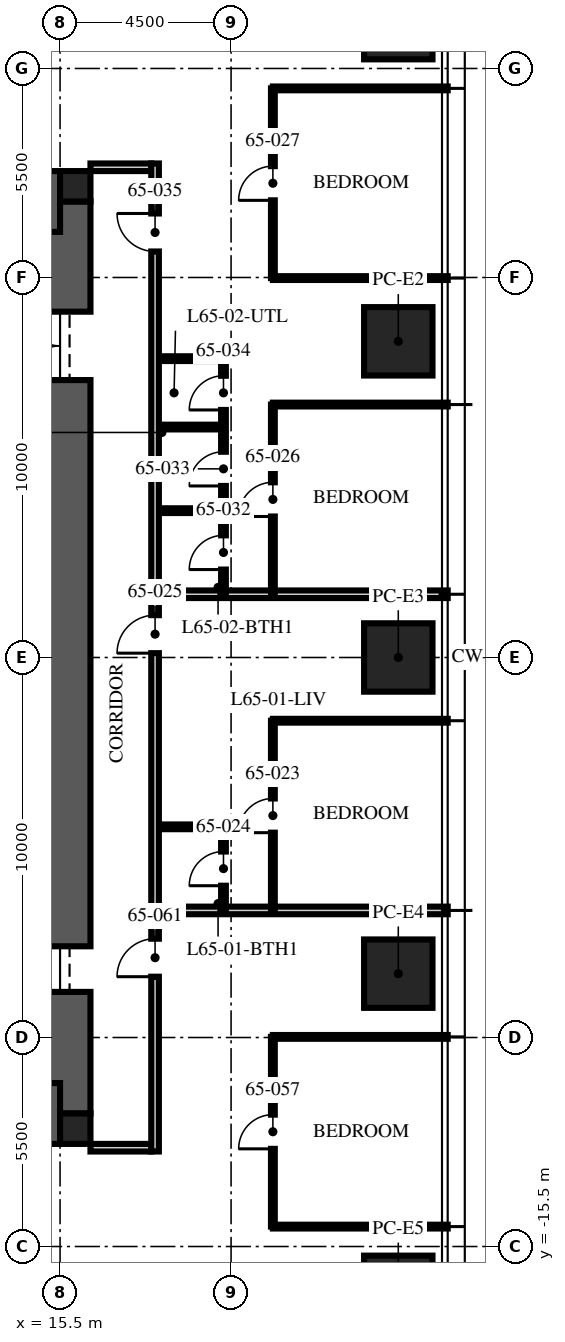
"""IFC4 building model, lengths in metres.
Left out: names, types, materials, properties, quantities, classifications, styles, units other than length and angle.
Written with IfcOpenShell. Run it as: python <this file> out.ifc"""

import sys

from ifc_helpers import new_model, si_unit, direction, frame, frame_2d, origin, origin_2d, place, context, subcontext, project, spatial, rectangle, extrude, element, fill, save


model = new_model("IFC4")
c1 = context("Model", 3, precision=1e-05, world=origin(), true_north=direction((0.0, 1.0)))
c2 = subcontext(c1, "Body", "Model", "MODEL_VIEW")
j1 = project(units=[si_unit("LENGTHUNIT", "METRE"), si_unit("PLANEANGLEUNIT", "RADIAN")], contexts=[c1])
p1 = place(None, origin())
s1 = spatial("IfcSite", under=j1, at=p1, CompositionType="ELEMENT")
p2 = place(p1, origin())
s2 = spatial("IfcBuilding", under=s1, at=p2, CompositionType="ELEMENT")
p3 = place(p2, frame((0.0, 0.0, 259.5)))
s3 = spatial("IfcBuildingStorey", under=s2, at=p3, CompositionType="ELEMENT", Elevation=259.5)
p4 = place(p3, frame((15.5, -12.0, -0.25), z_axis=(0.0, 0.0, 1.0), x_axis=(0.0, 1.0, 0.0)))
e1 = element("IfcWall", 1, at=p4, inside=s3, PredefinedType="SHEAR", context=c2, shape_type="SweptSolid", body=[
    extrude(rectangle(XDim=24.0, YDim=1.6, at=frame_2d((12.0, 0.0))), origin(), (0.0, 0.0, 1.0), 3.75),
])
p5 = place(p4, frame((3.2, 0.0, 0.25)))
e2 = element("IfcOpeningElement", 2, at=p5, cuts=e1, PredefinedType="OPENING", context=c2, shape_type="SweptSolid", body=[
    extrude(rectangle(XDim=1.2, YDim=2.1, at=frame_2d((0.6, 1.05))), frame((0.0, 0.81, 0.0), z_axis=(0.0, -1.0, 0.0), x_axis=(1.0, 0.0, 0.0)), (0.0, 0.0, 1.0), 1.62),
])
p6 = place(p4, frame((19.3, 0.0, 0.25)))
e3 = element("IfcOpeningElement", 3, at=p6, cuts=e1, PredefinedType="OPENING", context=c2, shape_type="SweptSolid", body=[
    extrude(rectangle(XDim=1.8, YDim=2.1, at=frame_2d((0.9, 1.05))), frame((0.0, 0.81, 0.0), z_axis=(0.0, -1.0, 0.0), x_axis=(1.0, 0.0, 0.0)), (0.0, 0.0, 1.0), 1.62),
])
for number, where, z_axis, x_axis in (
    (4, (-15.5, 12.0, -0.25), (0.0, 0.0, 1.0), (1.0, 0.0, 0.0)),
    (5, (-15.5, -12.0, -0.25), (0.0, 0.0, 1.0), (1.0, 0.0, 0.0)),
):
    element("IfcWall", number, at=place(p3, frame(where, z_axis=z_axis, x_axis=x_axis)), inside=s3, PredefinedType="SHEAR", context=c2, shape_type="SweptSolid", body=[
        extrude(rectangle(XDim=31.0, YDim=1.6, at=frame_2d((15.5, 0.0))), origin(), (0.0, 0.0, 1.0), 3.75),
    ])
for number, where, z_axis, x_axis in (
    (6, (15.9, 12.4, -0.25), (0.0, 0.0, 1.0), (1.0, 0.0, 0.0)),
    (7, (15.9, -12.4, -0.25), (0.0, 0.0, 1.0), (1.0, 0.0, 0.0)),
):
    element("IfcColumn", number, at=place(p3, frame(where, z_axis=z_axis, x_axis=x_axis)), inside=s3, PredefinedType="COLUMN", context=c2, shape_type="SweptSolid", body=[
        extrude(rectangle(XDim=0.8, YDim=0.8, at=origin_2d()), origin(), (0.0, 0.0, 1.0), 3.75),
    ])
for number, where, z_axis, x_axis in (
    (8, (24.4, 16.64, 0.0), (0.0, 0.0, 1.0), (0.0, 1.0, 0.0)),
    (9, (24.4, 8.32, 0.0), (0.0, 0.0, 1.0), (0.0, 1.0, 0.0)),
    (10, (24.4, 0.0, 0.0), (0.0, 0.0, 1.0), (0.0, 1.0, 0.0)),
    (11, (24.4, -8.32, 0.0), (0.0, 0.0, 1.0), (0.0, 1.0, 0.0)),
    (12, (24.4, -16.64, 0.0), (0.0, 0.0, 1.0), (0.0, 1.0, 0.0)),
):
    element("IfcColumn", number, at=place(p3, frame(where, z_axis=z_axis, x_axis=x_axis)), inside=s3, PredefinedType="COLUMN", context=c2, shape_type="SweptSolid", body=[
        extrude(rectangle(XDim=1.8, YDim=1.8, at=origin_2d()), origin(), (0.0, 0.0, 1.0), 3.75),
    ])
for number, where, z_axis, x_axis in (
    (13, (16.3, 12.9, 0.0), (0.0, 0.0, 1.0), (1.0, 0.0, 0.0)),
    (14, (16.3, -12.9, 0.0), (0.0, 0.0, 1.0), (1.0, 0.0, 0.0)),
):
    element("IfcWall", number, at=place(p3, frame(where, z_axis=z_axis, x_axis=x_axis)), inside=s3, PredefinedType="PARTITIONING", context=c2, shape_type="SweptSolid", body=[
        extrude(rectangle(XDim=1.6, YDim=0.2, at=frame_2d((0.8, 0.0))), origin(), (0.0, 0.0, 1.0), 2.3),
    ])
p7 = place(p3, frame((18.1, -6.656, 0.0), z_axis=(0.0, 0.0, 1.0), x_axis=(1.0, 0.0, 0.0)))
e15 = element("IfcWall", 15, at=p7, inside=s3, PredefinedType="PARTITIONING", context=c2, shape_type="SweptSolid", body=[
    extrude(rectangle(XDim=7.6, YDim=0.2, at=frame_2d((3.8, 0.0))), origin(), (0.0, 0.0, 1.0), 2.91),
])
p8 = place(p3, frame((21.1, -1.664, 0.0), z_axis=(0.0, 0.0, 1.0), x_axis=(1.0, 0.0, 0.0)))
e16 = element("IfcWall", 16, at=p8, inside=s3, PredefinedType="PARTITIONING", context=c2, shape_type="SweptSolid", body=[
    extrude(rectangle(XDim=4.6, YDim=0.1, at=frame_2d((2.3, 0.0))), origin(), (0.0, 0.0, 1.0), 2.91),
])
p9 = place(p3, frame((18.1, 1.664, 0.0), z_axis=(0.0, 0.0, 1.0), x_axis=(1.0, 0.0, 0.0)))
e17 = element("IfcWall", 17, at=p9, inside=s3, PredefinedType="PARTITIONING", context=c2, shape_type="SweptSolid", body=[
    extrude(rectangle(XDim=7.6, YDim=0.2, at=frame_2d((3.8, 0.0))), origin(), (0.0, 0.0, 1.0), 2.91),
])
for number, where, z_axis, x_axis in (
    (18, (21.1, 6.656, 0.0), (0.0, 0.0, 1.0), (1.0, 0.0, 0.0)),
    (19, (21.1, 9.984, 0.0), (0.0, 0.0, 1.0), (1.0, 0.0, 0.0)),
    (20, (21.1, 14.976, 0.0), (0.0, 0.0, 1.0), (1.0, 0.0, 0.0)),
    (21, (21.1, -14.976, 0.0), (0.0, 0.0, 1.0), (1.0, 0.0, 0.0)),
    (22, (21.1, -9.984, 0.0), (0.0, 0.0, 1.0), (1.0, 0.0, 0.0)),
):
    element("IfcWall", number, at=place(p3, frame(where, z_axis=z_axis, x_axis=x_axis)), inside=s3, PredefinedType="PARTITIONING", context=c2, shape_type="SweptSolid", body=[
        extrude(rectangle(XDim=4.6, YDim=0.1, at=frame_2d((2.3, 0.0))), origin(), (0.0, 0.0, 1.0), 2.91),
    ])
p10 = place(p3, frame((21.1, -6.656, 0.0), z_axis=(0.0, 0.0, 1.0), x_axis=(0.0, 1.0, 0.0)))
e23 = element("IfcWall", 23, at=p10, inside=s3, PredefinedType="PARTITIONING", context=c2, shape_type="SweptSolid", body=[
    extrude(rectangle(XDim=4.992, YDim=0.1, at=frame_2d((2.496, 0.0))), origin(), (0.0, 0.0, 1.0), 2.81),
])
p11 = place(p10, frame((2.046, 0.0, 0.0)))
e24 = element("IfcOpeningElement", 24, at=p11, cuts=e23, PredefinedType="OPENING", context=c2, shape_type="SweptSolid", body=[
    extrude(rectangle(XDim=0.9, YDim=2.1, at=frame_2d((0.45, 1.05))), frame((0.0, 0.06, 0.0), z_axis=(0.0, -1.0, 0.0), x_axis=(1.0, 0.0, 0.0)), (0.0, 0.0, 1.0), 0.12),
])
p12 = place(p3, frame((19.8, -6.656, 0.0), z_axis=(0.0, 0.0, 1.0), x_axis=(0.0, 1.0, 0.0)))
e25 = element("IfcWall", 25, at=p12, inside=s3, PredefinedType="PARTITIONING", context=c2, shape_type="SweptSolid", body=[
    extrude(rectangle(XDim=2.2, YDim=0.125, at=frame_2d((1.1, 0.0))), origin(), (0.0, 0.0, 1.0), 3.5),
])
p13 = place(p12, frame((0.65, 0.0, 0.0)))
e26 = element("IfcOpeningElement", 26, at=p13, cuts=e25, PredefinedType="OPENING", context=c2, shape_type="SweptSolid", body=[
    extrude(rectangle(XDim=0.9, YDim=2.1, at=frame_2d((0.45, 1.05))), frame((0.0, 0.073, 0.0), z_axis=(0.0, -1.0, 0.0), x_axis=(1.0, 0.0, 0.0)), (0.0, 0.0, 1.0), 0.145),
])
p14 = place(p3, frame((18.1, -4.456, 0.0), z_axis=(0.0, 0.0, 1.0), x_axis=(1.0, 0.0, 0.0)))
e27 = element("IfcWall", 27, at=p14, inside=s3, PredefinedType="PARTITIONING", context=c2, shape_type="SweptSolid", body=[
    extrude(rectangle(XDim=1.7, YDim=0.125, at=frame_2d((0.85, 0.0))), origin(), (0.0, 0.0, 1.0), 3.5),
])
p15 = place(p3, frame((21.1, 1.664, 0.0), z_axis=(0.0, 0.0, 1.0), x_axis=(0.0, 1.0, 0.0)))
e28 = element("IfcWall", 28, at=p15, inside=s3, PredefinedType="PARTITIONING", context=c2, shape_type="SweptSolid", body=[
    extrude(rectangle(XDim=4.992, YDim=0.1, at=frame_2d((2.496, 0.0))), origin(), (0.0, 0.0, 1.0), 2.81),
])
p16 = place(p15, frame((2.046, 0.0, 0.0)))
e29 = element("IfcOpeningElement", 29, at=p16, cuts=e28, PredefinedType="OPENING", context=c2, shape_type="SweptSolid", body=[
    extrude(rectangle(XDim=0.9, YDim=2.1, at=frame_2d((0.45, 1.05))), frame((0.0, 0.06, 0.0), z_axis=(0.0, -1.0, 0.0), x_axis=(1.0, 0.0, 0.0)), (0.0, 0.0, 1.0), 0.12),
])
p17 = place(p3, frame((21.1, 9.984, 0.0), z_axis=(0.0, 0.0, 1.0), x_axis=(0.0, 1.0, 0.0)))
e30 = element("IfcWall", 30, at=p17, inside=s3, PredefinedType="PARTITIONING", context=c2, shape_type="SweptSolid", body=[
    extrude(rectangle(XDim=4.992, YDim=0.1, at=frame_2d((2.496, 0.0))), origin(), (0.0, 0.0, 1.0), 2.81),
])
p18 = place(p17, frame((2.046, 0.0, 0.0)))
e31 = element("IfcOpeningElement", 31, at=p18, cuts=e30, PredefinedType="OPENING", context=c2, shape_type="SweptSolid", body=[
    extrude(rectangle(XDim=0.9, YDim=2.1, at=frame_2d((0.45, 1.05))), frame((0.0, 0.06, 0.0), z_axis=(0.0, -1.0, 0.0), x_axis=(1.0, 0.0, 0.0)), (0.0, 0.0, 1.0), 0.12),
])
p19 = place(p3, frame((19.8, 1.664, 0.0), z_axis=(0.0, 0.0, 1.0), x_axis=(0.0, 1.0, 0.0)))
e32 = element("IfcWall", 32, at=p19, inside=s3, PredefinedType="PARTITIONING", context=c2, shape_type="SweptSolid", body=[
    extrude(rectangle(XDim=6.2, YDim=0.125, at=frame_2d((3.1, 0.0))), origin(), (0.0, 0.0, 1.0), 2.81),
])
p20 = place(p19, frame((0.65, 0.0, 0.0)))
e33 = element("IfcOpeningElement", 33, at=p20, cuts=e32, PredefinedType="OPENING", context=c2, shape_type="SweptSolid", body=[
    extrude(rectangle(XDim=0.9, YDim=2.1, at=frame_2d((0.45, 1.05))), frame((0.0, 0.073, 0.0), z_axis=(0.0, -1.0, 0.0), x_axis=(1.0, 0.0, 0.0)), (0.0, 0.0, 1.0), 0.145),
])
p21 = place(p19, frame((2.85, 0.0, 0.0)))
e34 = element("IfcOpeningElement", 34, at=p21, cuts=e32, PredefinedType="OPENING", context=c2, shape_type="SweptSolid", body=[
    extrude(rectangle(XDim=0.9, YDim=2.1, at=frame_2d((0.45, 1.05))), frame((0.0, 0.073, 0.0), z_axis=(0.0, -1.0, 0.0), x_axis=(1.0, 0.0, 0.0)), (0.0, 0.0, 1.0), 0.145),
])
p22 = place(p19, frame((4.85, 0.0, 0.0)))
e35 = element("IfcOpeningElement", 35, at=p22, cuts=e32, PredefinedType="OPENING", context=c2, shape_type="SweptSolid", body=[
    extrude(rectangle(XDim=0.9, YDim=2.1, at=frame_2d((0.45, 1.05))), frame((0.0, 0.073, 0.0), z_axis=(0.0, -1.0, 0.0), x_axis=(1.0, 0.0, 0.0)), (0.0, 0.0, 1.0), 0.145),
])
for number, where, z_axis, x_axis in (
    (36, (18.1, 3.864, 0.0), (0.0, 0.0, 1.0), (1.0, 0.0, 0.0)),
    (37, (18.1, 6.064, 0.0), (0.0, 0.0, 1.0), (1.0, 0.0, 0.0)),
    (38, (18.1, 7.864, 0.0), (0.0, 0.0, 1.0), (1.0, 0.0, 0.0)),
):
    element("IfcWall", number, at=place(p3, frame(where, z_axis=z_axis, x_axis=x_axis)), inside=s3, PredefinedType="PARTITIONING", context=c2, shape_type="SweptSolid", body=[
        extrude(rectangle(XDim=1.7, YDim=0.125, at=frame_2d((0.85, 0.0))), origin(), (0.0, 0.0, 1.0), 3.5),
    ])
p23 = place(p3, frame((21.1, -14.976, 0.0), z_axis=(0.0, 0.0, 1.0), x_axis=(0.0, 1.0, 0.0)))
e39 = element("IfcWall", 39, at=p23, inside=s3, PredefinedType="PARTITIONING", context=c2, shape_type="SweptSolid", body=[
    extrude(rectangle(XDim=4.992, YDim=0.1, at=frame_2d((2.496, 0.0))), origin(), (0.0, 0.0, 1.0), 2.81),
])
p24 = place(p23, frame((2.046, 0.0, 0.0)))
e40 = element("IfcOpeningElement", 40, at=p24, cuts=e39, PredefinedType="OPENING", context=c2, shape_type="SweptSolid", body=[
    extrude(rectangle(XDim=0.9, YDim=2.1, at=frame_2d((0.45, 1.05))), frame((0.0, 0.06, 0.0), z_axis=(0.0, -1.0, 0.0), x_axis=(1.0, 0.0, 0.0)), (0.0, 0.0, 1.0), 0.12),
])
p25 = place(p3, frame((18.0, -13.0, 0.0), z_axis=(0.0, 0.0, 1.0), x_axis=(0.0, 1.0, 0.0)))
e41 = element("IfcWall", 41, at=p25, inside=s3, PredefinedType="PARTITIONING", context=c2, shape_type="SweptSolid", body=[
    extrude(rectangle(XDim=26.0, YDim=0.2, at=frame_2d((13.0, 0.0))), origin(), (0.0, 0.0, 1.0), 2.6),
])
p26 = place(p25, frame((13.114, 0.0, 0.0)))
e42 = element("IfcOpeningElement", 42, at=p26, cuts=e41, PredefinedType="OPENING", context=c2, shape_type="SweptSolid", body=[
    extrude(rectangle(XDim=1.0, YDim=2.2, at=frame_2d((0.5, 1.1))), frame((0.0, 0.11, 0.0), z_axis=(0.0, -1.0, 0.0), x_axis=(1.0, 0.0, 0.0)), (0.0, 0.0, 1.0), 0.22),
])
p27 = place(p25, frame((23.684, 0.0, 0.0)))
e43 = element("IfcOpeningElement", 43, at=p27, cuts=e41, PredefinedType="OPENING", context=c2, shape_type="SweptSolid", body=[
    extrude(rectangle(XDim=1.0, YDim=2.2, at=frame_2d((0.5, 1.1))), frame((0.0, 0.11, 0.0), z_axis=(0.0, -1.0, 0.0), x_axis=(1.0, 0.0, 0.0)), (0.0, 0.0, 1.0), 0.22),
])
p28 = place(p25, frame((4.6, 0.0, 0.0)))
e44 = element("IfcOpeningElement", 44, at=p28, cuts=e41, PredefinedType="OPENING", context=c2, shape_type="SweptSolid", body=[
    extrude(rectangle(XDim=1.0, YDim=2.2, at=frame_2d((0.5, 1.1))), frame((0.0, 0.11, 0.0), z_axis=(0.0, -1.0, 0.0), x_axis=(1.0, 0.0, 0.0)), (0.0, 0.0, 1.0), 0.22),
])
p29 = place(p5, origin())
e45 = element("IfcDoor", 45, at=p29, inside=s3, OperationType="SINGLE_SWING_LEFT", PredefinedType="DOOR", context=c2, shape_type="SweptSolid", body=[
    extrude(rectangle(XDim=1.2, YDim=2.1, at=frame_2d((0.6, 1.05))), frame((0.0, 0.025, 0.0), z_axis=(0.0, -1.0, 0.0), x_axis=(1.0, 0.0, 0.0)), (0.0, 0.0, 1.0), 0.05),
])
fill(e2, e45)
p30 = place(p6, origin())
e46 = element("IfcDoor", 46, at=p30, inside=s3, OperationType="DOUBLE_DOOR_SINGLE_SWING", PredefinedType="DOOR", context=c2, shape_type="SweptSolid", body=[
    extrude(rectangle(XDim=1.8, YDim=2.1, at=frame_2d((0.9, 1.05))), frame((0.0, 0.025, 0.0), z_axis=(0.0, -1.0, 0.0), x_axis=(1.0, 0.0, 0.0)), (0.0, 0.0, 1.0), 0.05),
])
fill(e3, e46)
p31 = place(p11, origin())
e47 = element("IfcDoor", 47, at=p31, inside=s3, OperationType="SINGLE_SWING_LEFT", PredefinedType="DOOR", context=c2, shape_type="SweptSolid", body=[
    extrude(rectangle(XDim=0.9, YDim=2.1, at=frame_2d((0.45, 1.05))), frame((0.0, 0.025, 0.0), z_axis=(0.0, -1.0, 0.0), x_axis=(1.0, 0.0, 0.0)), (0.0, 0.0, 1.0), 0.05),
])
fill(e24, e47)
p32 = place(p13, origin())
e48 = element("IfcDoor", 48, at=p32, inside=s3, OperationType="SINGLE_SWING_LEFT", PredefinedType="DOOR", context=c2, shape_type="SweptSolid", body=[
    extrude(rectangle(XDim=0.9, YDim=2.1, at=frame_2d((0.45, 1.05))), frame((0.0, 0.025, 0.0), z_axis=(0.0, -1.0, 0.0), x_axis=(1.0, 0.0, 0.0)), (0.0, 0.0, 1.0), 0.05),
])
fill(e26, e48)
p33 = place(p26, origin())
e49 = element("IfcDoor", 49, at=p33, inside=s3, OperationType="SINGLE_SWING_LEFT", PredefinedType="DOOR", context=c2, shape_type="SweptSolid", body=[
    extrude(rectangle(XDim=1.0, YDim=2.2, at=frame_2d((0.5, 1.1))), frame((0.0, 0.025, 0.0), z_axis=(0.0, -1.0, 0.0), x_axis=(1.0, 0.0, 0.0)), (0.0, 0.0, 1.0), 0.05),
])
fill(e42, e49)
p34 = place(p16, origin())
e50 = element("IfcDoor", 50, at=p34, inside=s3, OperationType="SINGLE_SWING_LEFT", PredefinedType="DOOR", context=c2, shape_type="SweptSolid", body=[
    extrude(rectangle(XDim=0.9, YDim=2.1, at=frame_2d((0.45, 1.05))), frame((0.0, 0.025, 0.0), z_axis=(0.0, -1.0, 0.0), x_axis=(1.0, 0.0, 0.0)), (0.0, 0.0, 1.0), 0.05),
])
fill(e29, e50)
p35 = place(p18, origin())
e51 = element("IfcDoor", 51, at=p35, inside=s3, OperationType="SINGLE_SWING_LEFT", PredefinedType="DOOR", context=c2, shape_type="SweptSolid", body=[
    extrude(rectangle(XDim=0.9, YDim=2.1, at=frame_2d((0.45, 1.05))), frame((0.0, 0.025, 0.0), z_axis=(0.0, -1.0, 0.0), x_axis=(1.0, 0.0, 0.0)), (0.0, 0.0, 1.0), 0.05),
])
fill(e31, e51)
p36 = place(p20, origin())
e52 = element("IfcDoor", 52, at=p36, inside=s3, OperationType="SINGLE_SWING_LEFT", PredefinedType="DOOR", context=c2, shape_type="SweptSolid", body=[
    extrude(rectangle(XDim=0.9, YDim=2.1, at=frame_2d((0.45, 1.05))), frame((0.0, 0.025, 0.0), z_axis=(0.0, -1.0, 0.0), x_axis=(1.0, 0.0, 0.0)), (0.0, 0.0, 1.0), 0.05),
])
fill(e33, e52)
p37 = place(p21, origin())
e53 = element("IfcDoor", 53, at=p37, inside=s3, OperationType="SINGLE_SWING_LEFT", PredefinedType="DOOR", context=c2, shape_type="SweptSolid", body=[
    extrude(rectangle(XDim=0.9, YDim=2.1, at=frame_2d((0.45, 1.05))), frame((0.0, 0.025, 0.0), z_axis=(0.0, -1.0, 0.0), x_axis=(1.0, 0.0, 0.0)), (0.0, 0.0, 1.0), 0.05),
])
fill(e34, e53)
p38 = place(p22, origin())
e54 = element("IfcDoor", 54, at=p38, inside=s3, OperationType="SINGLE_SWING_LEFT", PredefinedType="DOOR", context=c2, shape_type="SweptSolid", body=[
    extrude(rectangle(XDim=0.9, YDim=2.1, at=frame_2d((0.45, 1.05))), frame((0.0, 0.025, 0.0), z_axis=(0.0, -1.0, 0.0), x_axis=(1.0, 0.0, 0.0)), (0.0, 0.0, 1.0), 0.05),
])
fill(e35, e54)
p39 = place(p27, origin())
e55 = element("IfcDoor", 55, at=p39, inside=s3, OperationType="SINGLE_SWING_RIGHT", PredefinedType="DOOR", context=c2, shape_type="SweptSolid", body=[
    extrude(rectangle(XDim=1.0, YDim=2.2, at=frame_2d((0.5, 1.1))), frame((0.0, 0.025, 0.0), z_axis=(0.0, -1.0, 0.0), x_axis=(1.0, 0.0, 0.0)), (0.0, 0.0, 1.0), 0.05),
])
fill(e43, e55)
p40 = place(p24, origin())
e56 = element("IfcDoor", 56, at=p40, inside=s3, OperationType="SINGLE_SWING_LEFT", PredefinedType="DOOR", context=c2, shape_type="SweptSolid", body=[
    extrude(rectangle(XDim=0.9, YDim=2.1, at=frame_2d((0.45, 1.05))), frame((0.0, 0.025, 0.0), z_axis=(0.0, -1.0, 0.0), x_axis=(1.0, 0.0, 0.0)), (0.0, 0.0, 1.0), 0.05),
])
fill(e40, e56)
p41 = place(p28, origin())
e57 = element("IfcDoor", 57, at=p41, inside=s3, OperationType="SINGLE_SWING_LEFT", PredefinedType="DOOR", context=c2, shape_type="SweptSolid", body=[
    extrude(rectangle(XDim=1.0, YDim=2.2, at=frame_2d((0.5, 1.1))), frame((0.0, 0.025, 0.0), z_axis=(0.0, -1.0, 0.0), x_axis=(1.0, 0.0, 0.0)), (0.0, 0.0, 1.0), 0.05),
])
fill(e44, e57)
save(model, sys.argv[1])
